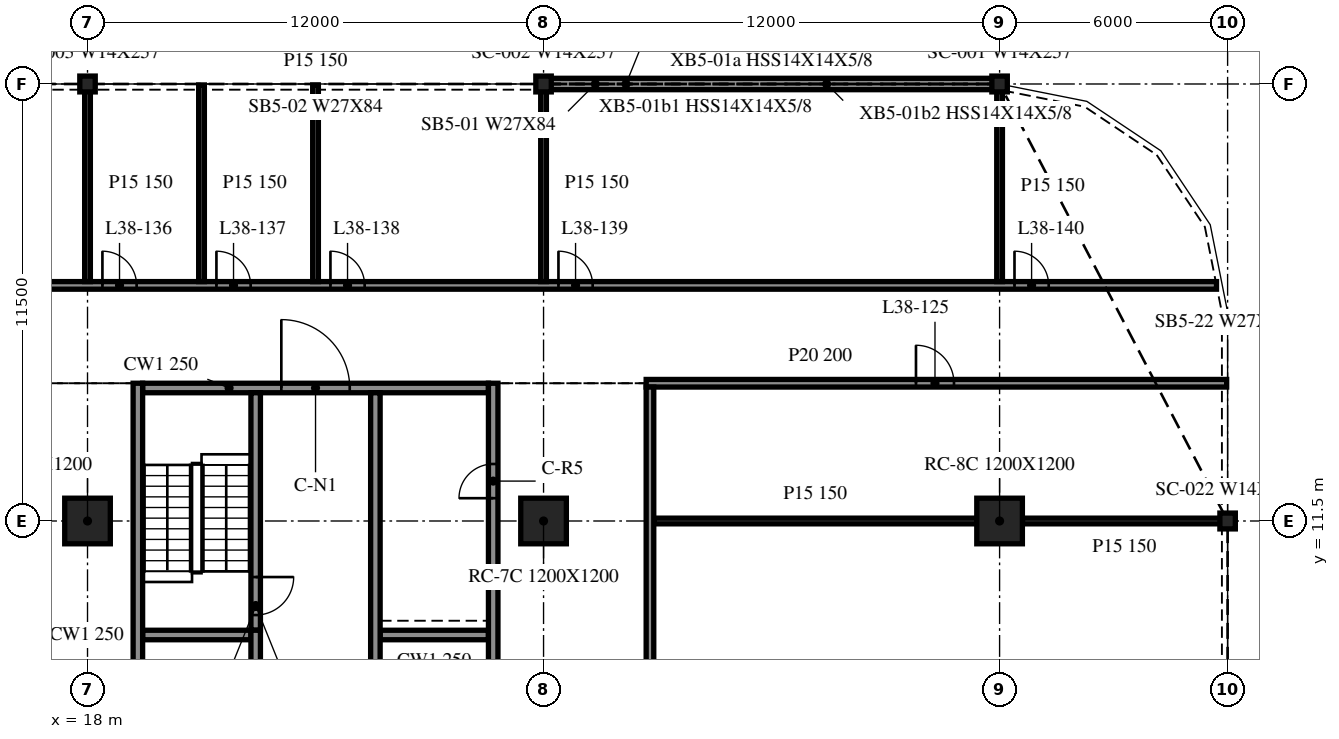
"""IFC4 building model, lengths in metres.
Left out: names, types, materials, properties, quantities, classifications, styles, units other than length and angle.
Written with IfcOpenShell. Run it as: python <this file> out.ifc"""

import sys

from ifc_helpers import new_model, si_unit, direction, frame, frame_2d, origin, origin_2d, place, context, subcontext, project, spatial, rectangle, i_section, extrude, element, fill, save


model = new_model("IFC4")
c1 = context("Model", 3, precision=1e-05, world=origin(), true_north=direction((0.0, 1.0)))
c2 = subcontext(c1, "Body", "Model", "MODEL_VIEW")
j1 = project(units=[si_unit("LENGTHUNIT", "METRE"), si_unit("PLANEANGLEUNIT", "RADIAN")], contexts=[c1])
p1 = place(None, origin())
s1 = spatial("IfcSite", under=j1, at=p1, CompositionType="ELEMENT")
p2 = place(p1, origin())
s2 = spatial("IfcBuilding", under=s1, at=p2, CompositionType="ELEMENT")
p3 = place(p2, frame((0.0, 0.0, 163.0)))
s3 = spatial("IfcBuildingStorey", under=s2, at=p3, CompositionType="ELEMENT", Elevation=163.0)
for number, where, z_axis, x_axis in (
    (1, (18.0, 11.5, -0.34), (0.0, 0.0, 1.0), (1.0, 0.0, 0.0)),
    (2, (30.0, 11.5, -0.34), (0.0, 0.0, 1.0), (1.0, 0.0, 0.0)),
    (3, (42.0, 11.5, -0.34), (0.0, 0.0, 1.0), (1.0, 0.0, 0.0)),
):
    element("IfcColumn", number, at=place(p3, frame(where, z_axis=z_axis, x_axis=x_axis)), inside=s3, PredefinedType="COLUMN", context=c2, shape_type="SweptSolid", body=[
        extrude(rectangle(XDim=1.2, YDim=1.2, at=origin_2d()), origin(), (0.0, 0.0, 1.0), 3.8),
    ])
for number, where, z_axis, x_axis in (
    (4, (42.0, 23.0, -0.34), (0.0, 0.0, 1.0), (1.0, 0.0, 0.0)),
    (5, (30.0, 23.0, -0.34), (0.0, 0.0, 1.0), (1.0, 0.0, 0.0)),
    (6, (18.0, 23.0, -0.34), (0.0, 0.0, 1.0), (1.0, 0.0, 0.0)),
    (7, (48.0, 11.5, -0.34), (0.0, 0.0, 1.0), (1.0, 0.0, 0.0)),
):
    element("IfcColumn", number, at=place(p3, frame(where, z_axis=z_axis, x_axis=x_axis)), inside=s3, PredefinedType="COLUMN", context=c2, shape_type="SweptSolid", body=[
        extrude(i_section(OverallWidth=0.406, OverallDepth=0.417, WebThickness=0.03, FlangeThickness=0.048, at=origin_2d()), origin(), (0.0, 0.0, 1.0), 3.8),
    ])
p4 = place(p3, frame((41.985, 23.0, 0.0), z_axis=(0.0, 0.0, 1.0), x_axis=(-1.0, 0.0, 0.0)))
e8 = element("IfcWall", 8, at=p4, inside=s3, PredefinedType="NOTDEFINED", context=c2, shape_type="SweptSolid", body=[
    extrude(rectangle(XDim=11.97, YDim=0.3, at=frame_2d((5.985, 0.0))), origin(), (0.0, 0.0, 1.0), 2.782),
])
p5 = place(p3, frame((19.325, 15.125, 0.0), z_axis=(0.0, 0.0, 1.0), x_axis=(0.0, -1.0, 0.0)))
e9 = element("IfcWall", 9, at=p5, inside=s3, PredefinedType="SOLIDWALL", context=c2, shape_type="SweptSolid", body=[
    extrude(rectangle(XDim=24.25, YDim=0.25, at=frame_2d((12.125, 0.0))), origin(), (0.0, 0.0, 1.0), 3.46),
])
p6 = place(p3, frame((28.675, -9.125, 0.0), z_axis=(0.0, 0.0, 1.0), x_axis=(0.0, 1.0, 0.0)))
e10 = element("IfcWall", 10, at=p6, inside=s3, PredefinedType="SOLIDWALL", context=c2, shape_type="SweptSolid", body=[
    extrude(rectangle(XDim=24.25, YDim=0.25, at=frame_2d((12.125, 0.0))), origin(), (0.0, 0.0, 1.0), 3.46),
])
p7 = place(p6, frame((14.425, 0.0, 0.0)))
e11 = element("IfcOpeningElement", 11, at=p7, cuts=e10, PredefinedType="OPENING", context=c2, shape_type="SweptSolid", body=[
    extrude(rectangle(XDim=0.9, YDim=2.1, at=frame_2d((0.45, 1.05))), frame((0.0, 0.135, 0.0), z_axis=(0.0, -1.0, 0.0), x_axis=(1.0, 0.0, 0.0)), (0.0, 0.0, 1.0), 0.27),
])
p8 = place(p6, frame((21.225, 0.0, 0.0)))
e12 = element("IfcOpeningElement", 12, at=p8, cuts=e10, PredefinedType="OPENING", context=c2, shape_type="SweptSolid", body=[
    extrude(rectangle(XDim=0.9, YDim=2.1, at=frame_2d((0.45, 1.05))), frame((0.0, 0.135, 0.0), z_axis=(0.0, -1.0, 0.0), x_axis=(1.0, 0.0, 0.0)), (0.0, 0.0, 1.0), 0.27),
])
p9 = place(p3, frame((19.45, 15.0, 0.0), z_axis=(0.0, 0.0, 1.0), x_axis=(1.0, 0.0, 0.0)))
e13 = element("IfcWall", 13, at=p9, inside=s3, PredefinedType="SOLIDWALL", context=c2, shape_type="SweptSolid", body=[
    extrude(rectangle(XDim=9.1, YDim=0.25, at=frame_2d((4.55, 0.0))), origin(), (0.0, 0.0, 1.0), 3.46),
])
p10 = place(p9, frame((3.65, 0.0, 0.0)))
e14 = element("IfcOpeningElement", 14, at=p10, cuts=e13, PredefinedType="OPENING", context=c2, shape_type="SweptSolid", body=[
    extrude(rectangle(XDim=1.8, YDim=2.1, at=frame_2d((0.9, 1.05))), frame((0.0, 0.135, 0.0), z_axis=(0.0, -1.0, 0.0), x_axis=(1.0, 0.0, 0.0)), (0.0, 0.0, 1.0), 0.27),
])
p11 = place(p3, frame((22.425, -8.875, 0.0), z_axis=(0.0, 0.0, 1.0), x_axis=(0.0, 1.0, 0.0)))
e15 = element("IfcWall", 15, at=p11, inside=s3, PredefinedType="SOLIDWALL", context=c2, shape_type="SweptSolid", body=[
    extrude(rectangle(XDim=17.5, YDim=0.25, at=frame_2d((8.75, 0.0))), origin(), (0.0, 0.0, 1.0), 3.46),
])
p12 = place(p11, frame((7.2, 0.0, 0.0)))
e16 = element("IfcOpeningElement", 16, at=p12, cuts=e15, PredefinedType="OPENING", context=c2, shape_type="SweptSolid", body=[
    extrude(rectangle(XDim=1.1, YDim=2.1, at=frame_2d((0.55, 1.05))), frame((0.0, 0.135, 0.0), z_axis=(0.0, -1.0, 0.0), x_axis=(1.0, 0.0, 0.0)), (0.0, 0.0, 1.0), 0.27),
])
p13 = place(p11, frame((9.95, 0.0, 0.0)))
e17 = element("IfcOpeningElement", 17, at=p13, cuts=e15, PredefinedType="OPENING", context=c2, shape_type="SweptSolid", body=[
    extrude(rectangle(XDim=1.1, YDim=2.1, at=frame_2d((0.55, 1.05))), frame((0.0, 0.135, 0.0), z_axis=(0.0, -1.0, 0.0), x_axis=(1.0, 0.0, 0.0)), (0.0, 0.0, 1.0), 0.27),
])
p14 = place(p11, frame((12.7, 0.0, 0.0)))
e18 = element("IfcOpeningElement", 18, at=p14, cuts=e15, PredefinedType="OPENING", context=c2, shape_type="SweptSolid", body=[
    extrude(rectangle(XDim=1.1, YDim=2.1, at=frame_2d((0.55, 1.05))), frame((0.0, 0.135, 0.0), z_axis=(0.0, -1.0, 0.0), x_axis=(1.0, 0.0, 0.0)), (0.0, 0.0, 1.0), 0.27),
])
p15 = place(p11, frame((15.45, 0.0, 0.0)))
e19 = element("IfcOpeningElement", 19, at=p15, cuts=e15, PredefinedType="OPENING", context=c2, shape_type="SweptSolid", body=[
    extrude(rectangle(XDim=1.1, YDim=2.1, at=frame_2d((0.55, 1.05))), frame((0.0, 0.135, 0.0), z_axis=(0.0, -1.0, 0.0), x_axis=(1.0, 0.0, 0.0)), (0.0, 0.0, 1.0), 0.27),
])
p16 = place(p11, frame((1.012, 0.0, 0.0)))
e20 = element("IfcOpeningElement", 20, at=p16, cuts=e15, PredefinedType="OPENING", context=c2, shape_type="SweptSolid", body=[
    extrude(rectangle(XDim=0.9, YDim=2.1, at=frame_2d((0.45, 1.05))), frame((0.0, 0.135, 0.0), z_axis=(0.0, -1.0, 0.0), x_axis=(1.0, 0.0, 0.0)), (0.0, 0.0, 1.0), 0.27),
])
p17 = place(p11, frame((4.087, 0.0, 0.0)))
e21 = element("IfcOpeningElement", 21, at=p17, cuts=e15, PredefinedType="OPENING", context=c2, shape_type="SweptSolid", body=[
    extrude(rectangle(XDim=0.9, YDim=2.1, at=frame_2d((0.45, 1.05))), frame((0.0, 0.135, 0.0), z_axis=(0.0, -1.0, 0.0), x_axis=(1.0, 0.0, 0.0)), (0.0, 0.0, 1.0), 0.27),
])
p18 = place(p3, frame((22.425, 14.875, 0.0), z_axis=(0.0, 0.0, 1.0), x_axis=(0.0, -1.0, 0.0)))
e22 = element("IfcWall", 22, at=p18, inside=s3, PredefinedType="SOLIDWALL", context=c2, shape_type="SweptSolid", body=[
    extrude(rectangle(XDim=6.25, YDim=0.25, at=frame_2d((3.125, 0.0))), origin(), (0.0, 0.0, 1.0), 3.46),
])
p19 = place(p18, frame((4.85, 0.0, 0.0)))
e23 = element("IfcOpeningElement", 23, at=p19, cuts=e22, PredefinedType="OPENING", context=c2, shape_type="SweptSolid", body=[
    extrude(rectangle(XDim=1.0, YDim=2.1, at=frame_2d((0.5, 1.05))), frame((0.0, 0.135, 0.0), z_axis=(0.0, -1.0, 0.0), x_axis=(1.0, 0.0, 0.0)), (0.0, 0.0, 1.0), 0.27),
])
p20 = place(p3, frame((25.575, 14.875, 0.0), z_axis=(0.0, 0.0, 1.0), x_axis=(0.0, -1.0, 0.0)))
e24 = element("IfcWall", 24, at=p20, inside=s3, PredefinedType="SOLIDWALL", context=c2, shape_type="SweptSolid", body=[
    extrude(rectangle(XDim=17.5, YDim=0.25, at=frame_2d((8.75, 0.0))), origin(), (0.0, 0.0, 1.0), 3.46),
])
p21 = place(p20, frame((15.45, 0.0, 0.0)))
e25 = element("IfcOpeningElement", 25, at=p21, cuts=e24, PredefinedType="OPENING", context=c2, shape_type="SweptSolid", body=[
    extrude(rectangle(XDim=1.1, YDim=2.1, at=frame_2d((0.55, 1.05))), frame((0.0, 0.135, 0.0), z_axis=(0.0, -1.0, 0.0), x_axis=(1.0, 0.0, 0.0)), (0.0, 0.0, 1.0), 0.27),
])
p22 = place(p20, frame((12.8, 0.0, 0.0)))
e26 = element("IfcOpeningElement", 26, at=p22, cuts=e24, PredefinedType="OPENING", context=c2, shape_type="SweptSolid", body=[
    extrude(rectangle(XDim=0.9, YDim=2.1, at=frame_2d((0.45, 1.05))), frame((0.0, 0.135, 0.0), z_axis=(0.0, -1.0, 0.0), x_axis=(1.0, 0.0, 0.0)), (0.0, 0.0, 1.0), 0.27),
])
for number, where, z_axis, x_axis in (
    (27, (19.45, 8.5, 0.0), (0.0, 0.0, 1.0), (1.0, 0.0, 0.0)),
    (28, (25.7, 8.5, 0.0), (0.0, 0.0, 1.0), (1.0, 0.0, 0.0)),
):
    element("IfcWall", number, at=place(p3, frame(where, z_axis=z_axis, x_axis=x_axis)), inside=s3, PredefinedType="SOLIDWALL", context=c2, shape_type="SweptSolid", body=[
        extrude(rectangle(XDim=2.85, YDim=0.25, at=frame_2d((1.425, 0.0))), origin(), (0.0, 0.0, 1.0), 3.46),
    ])
p23 = place(p3, frame((32.9, 11.5, 0.0), z_axis=(0.0, 0.0, 1.0), x_axis=(1.0, 0.0, 0.0)))
e29 = element("IfcWall", 29, at=p23, inside=s3, PredefinedType="PARTITIONING", context=c2, shape_type="SweptSolid", body=[
    extrude(rectangle(XDim=8.5, YDim=0.15, at=frame_2d((4.25, 0.0))), origin(), (0.0, 0.0, 1.0), 3.46),
])
p24 = place(p3, frame((42.6, 11.5, 0.0), z_axis=(0.0, 0.0, 1.0), x_axis=(1.0, 0.0, 0.0)))
e30 = element("IfcWall", 30, at=p24, inside=s3, PredefinedType="PARTITIONING", context=c2, shape_type="SweptSolid", body=[
    extrude(rectangle(XDim=5.375, YDim=0.15, at=frame_2d((2.688, 0.0))), origin(), (0.0, 0.0, 1.0), 3.46),
])
p25 = place(p3, frame((32.7, 15.125, 0.0), z_axis=(0.0, 0.0, 1.0), x_axis=(1.0, 0.0, 0.0)))
e31 = element("IfcWall", 31, at=p25, inside=s3, PredefinedType="PARTITIONING", context=c2, shape_type="SweptSolid", body=[
    extrude(rectangle(XDim=15.275, YDim=0.2, at=frame_2d((7.638, 0.0))), origin(), (0.0, 0.0, 1.0), 3.46),
])
p26 = place(p25, frame((7.1, 0.0, 0.0)))
e32 = element("IfcOpeningElement", 32, at=p26, cuts=e31, PredefinedType="OPENING", context=c2, shape_type="SweptSolid", body=[
    extrude(rectangle(XDim=1.0, YDim=2.1, at=frame_2d((0.5, 1.05))), frame((0.0, 0.11, 0.0), z_axis=(0.0, -1.0, 0.0), x_axis=(1.0, 0.0, 0.0)), (0.0, 0.0, 1.0), 0.22),
])
p27 = place(p3, frame((-47.708, 17.7, 0.0), z_axis=(0.0, 0.0, 1.0), x_axis=(1.0, 0.0, 0.0)))
e33 = element("IfcWall", 33, at=p27, inside=s3, PredefinedType="PARTITIONING", context=c2, shape_type="SweptSolid", body=[
    extrude(rectangle(XDim=95.416, YDim=0.2, at=frame_2d((47.708, 0.0))), origin(), (0.0, 0.0, 1.0), 3.46),
])
p28 = place(p27, frame((4.5, 0.0, 0.0)))
e34 = element("IfcOpeningElement", 34, at=p28, cuts=e33, PredefinedType="OPENING", context=c2, shape_type="SweptSolid", body=[
    extrude(rectangle(XDim=0.9, YDim=2.1, at=frame_2d((0.45, 1.05))), frame((0.0, 0.11, 0.0), z_axis=(0.0, -1.0, 0.0), x_axis=(1.0, 0.0, 0.0)), (0.0, 0.0, 1.0), 0.22),
])
p29 = place(p27, frame((16.5, 0.0, 0.0)))
e35 = element("IfcOpeningElement", 35, at=p29, cuts=e33, PredefinedType="OPENING", context=c2, shape_type="SweptSolid", body=[
    extrude(rectangle(XDim=0.9, YDim=2.1, at=frame_2d((0.45, 1.05))), frame((0.0, 0.11, 0.0), z_axis=(0.0, -1.0, 0.0), x_axis=(1.0, 0.0, 0.0)), (0.0, 0.0, 1.0), 0.22),
])
p30 = place(p27, frame((19.5, 0.0, 0.0)))
e36 = element("IfcOpeningElement", 36, at=p30, cuts=e33, PredefinedType="OPENING", context=c2, shape_type="SweptSolid", body=[
    extrude(rectangle(XDim=0.9, YDim=2.1, at=frame_2d((0.45, 1.05))), frame((0.0, 0.11, 0.0), z_axis=(0.0, -1.0, 0.0), x_axis=(1.0, 0.0, 0.0)), (0.0, 0.0, 1.0), 0.22),
])
p31 = place(p27, frame((22.5, 0.0, 0.0)))
e37 = element("IfcOpeningElement", 37, at=p31, cuts=e33, PredefinedType="OPENING", context=c2, shape_type="SweptSolid", body=[
    extrude(rectangle(XDim=0.9, YDim=2.1, at=frame_2d((0.45, 1.05))), frame((0.0, 0.11, 0.0), z_axis=(0.0, -1.0, 0.0), x_axis=(1.0, 0.0, 0.0)), (0.0, 0.0, 1.0), 0.22),
])
p32 = place(p27, frame((28.5, 0.0, 0.0)))
e38 = element("IfcOpeningElement", 38, at=p32, cuts=e33, PredefinedType="OPENING", context=c2, shape_type="SweptSolid", body=[
    extrude(rectangle(XDim=0.9, YDim=2.1, at=frame_2d((0.45, 1.05))), frame((0.0, 0.11, 0.0), z_axis=(0.0, -1.0, 0.0), x_axis=(1.0, 0.0, 0.0)), (0.0, 0.0, 1.0), 0.22),
])
p33 = place(p27, frame((40.5, 0.0, 0.0)))
e39 = element("IfcOpeningElement", 39, at=p33, cuts=e33, PredefinedType="OPENING", context=c2, shape_type="SweptSolid", body=[
    extrude(rectangle(XDim=0.9, YDim=2.1, at=frame_2d((0.45, 1.05))), frame((0.0, 0.11, 0.0), z_axis=(0.0, -1.0, 0.0), x_axis=(1.0, 0.0, 0.0)), (0.0, 0.0, 1.0), 0.22),
])
p34 = place(p27, frame((43.5, 0.0, 0.0)))
e40 = element("IfcOpeningElement", 40, at=p34, cuts=e33, PredefinedType="OPENING", context=c2, shape_type="SweptSolid", body=[
    extrude(rectangle(XDim=0.9, YDim=2.1, at=frame_2d((0.45, 1.05))), frame((0.0, 0.11, 0.0), z_axis=(0.0, -1.0, 0.0), x_axis=(1.0, 0.0, 0.0)), (0.0, 0.0, 1.0), 0.22),
])
p35 = place(p27, frame((46.5, 0.0, 0.0)))
e41 = element("IfcOpeningElement", 41, at=p35, cuts=e33, PredefinedType="OPENING", context=c2, shape_type="SweptSolid", body=[
    extrude(rectangle(XDim=0.9, YDim=2.1, at=frame_2d((0.45, 1.05))), frame((0.0, 0.11, 0.0), z_axis=(0.0, -1.0, 0.0), x_axis=(1.0, 0.0, 0.0)), (0.0, 0.0, 1.0), 0.22),
])
p36 = place(p27, frame((48.1, 0.0, 0.0)))
e42 = element("IfcOpeningElement", 42, at=p36, cuts=e33, PredefinedType="OPENING", context=c2, shape_type="SweptSolid", body=[
    extrude(rectangle(XDim=0.9, YDim=2.1, at=frame_2d((0.45, 1.05))), frame((0.0, 0.11, 0.0), z_axis=(0.0, -1.0, 0.0), x_axis=(1.0, 0.0, 0.0)), (0.0, 0.0, 1.0), 0.22),
])
p37 = place(p27, frame((54.1, 0.0, 0.0)))
e43 = element("IfcOpeningElement", 43, at=p37, cuts=e33, PredefinedType="OPENING", context=c2, shape_type="SweptSolid", body=[
    extrude(rectangle(XDim=0.9, YDim=2.1, at=frame_2d((0.45, 1.05))), frame((0.0, 0.11, 0.0), z_axis=(0.0, -1.0, 0.0), x_axis=(1.0, 0.0, 0.0)), (0.0, 0.0, 1.0), 0.22),
])
p38 = place(p27, frame((66.1, 0.0, 0.0)))
e44 = element("IfcOpeningElement", 44, at=p38, cuts=e33, PredefinedType="OPENING", context=c2, shape_type="SweptSolid", body=[
    extrude(rectangle(XDim=0.9, YDim=2.1, at=frame_2d((0.45, 1.05))), frame((0.0, 0.11, 0.0), z_axis=(0.0, -1.0, 0.0), x_axis=(1.0, 0.0, 0.0)), (0.0, 0.0, 1.0), 0.22),
])
p39 = place(p27, frame((69.1, 0.0, 0.0)))
e45 = element("IfcOpeningElement", 45, at=p39, cuts=e33, PredefinedType="OPENING", context=c2, shape_type="SweptSolid", body=[
    extrude(rectangle(XDim=0.9, YDim=2.1, at=frame_2d((0.45, 1.05))), frame((0.0, 0.11, 0.0), z_axis=(0.0, -1.0, 0.0), x_axis=(1.0, 0.0, 0.0)), (0.0, 0.0, 1.0), 0.22),
])
p40 = place(p27, frame((72.1, 0.0, 0.0)))
e46 = element("IfcOpeningElement", 46, at=p40, cuts=e33, PredefinedType="OPENING", context=c2, shape_type="SweptSolid", body=[
    extrude(rectangle(XDim=0.9, YDim=2.1, at=frame_2d((0.45, 1.05))), frame((0.0, 0.11, 0.0), z_axis=(0.0, -1.0, 0.0), x_axis=(1.0, 0.0, 0.0)), (0.0, 0.0, 1.0), 0.22),
])
p41 = place(p27, frame((78.1, 0.0, 0.0)))
e47 = element("IfcOpeningElement", 47, at=p41, cuts=e33, PredefinedType="OPENING", context=c2, shape_type="SweptSolid", body=[
    extrude(rectangle(XDim=0.9, YDim=2.1, at=frame_2d((0.45, 1.05))), frame((0.0, 0.11, 0.0), z_axis=(0.0, -1.0, 0.0), x_axis=(1.0, 0.0, 0.0)), (0.0, 0.0, 1.0), 0.22),
])
p42 = place(p27, frame((90.1, 0.0, 0.0)))
e48 = element("IfcOpeningElement", 48, at=p42, cuts=e33, PredefinedType="OPENING", context=c2, shape_type="SweptSolid", body=[
    extrude(rectangle(XDim=0.9, YDim=2.1, at=frame_2d((0.45, 1.05))), frame((0.0, 0.11, 0.0), z_axis=(0.0, -1.0, 0.0), x_axis=(1.0, 0.0, 0.0)), (0.0, 0.0, 1.0), 0.22),
])
for number, where, z_axis, x_axis in (
    (49, (18.0, 17.8, 0.0), (0.0, 0.0, 1.0), (0.0, 1.0, 0.0)),
    (50, (21.0, 17.8, 0.0), (0.0, 0.0, 1.0), (0.0, 1.0, 0.0)),
    (51, (24.0, 17.8, 0.0), (0.0, 0.0, 1.0), (0.0, 1.0, 0.0)),
    (52, (30.0, 17.8, 0.0), (0.0, 0.0, 1.0), (0.0, 1.0, 0.0)),
):
    element("IfcWall", number, at=place(p3, frame(where, z_axis=z_axis, x_axis=x_axis)), inside=s3, PredefinedType="PARTITIONING", context=c2, shape_type="SweptSolid", body=[
        extrude(rectangle(XDim=5.175, YDim=0.15, at=frame_2d((2.587, 0.0))), origin(), (0.0, 0.0, 1.0), 3.46),
    ])
p43 = place(p3, frame((32.8, -9.025, 0.0), z_axis=(0.0, 0.0, 1.0), x_axis=(0.0, 1.0, 0.0)))
e53 = element("IfcWall", 53, at=p43, inside=s3, PredefinedType="PARTITIONING", context=c2, shape_type="SweptSolid", body=[
    extrude(rectangle(XDim=24.05, YDim=0.2, at=frame_2d((12.025, 0.0))), origin(), (0.0, 0.0, 1.0), 3.46),
])
p44 = place(p43, frame((12.3, 0.0, 0.0)))
e54 = element("IfcOpeningElement", 54, at=p44, cuts=e53, PredefinedType="OPENING", context=c2, shape_type="SweptSolid", body=[
    extrude(rectangle(XDim=1.0, YDim=2.1, at=frame_2d((0.5, 1.05))), frame((0.0, 0.11, 0.0), z_axis=(0.0, -1.0, 0.0), x_axis=(1.0, 0.0, 0.0)), (0.0, 0.0, 1.0), 0.22),
])
p45 = place(p3, frame((42.0, 17.8, 0.0), z_axis=(0.0, 0.0, 1.0), x_axis=(0.0, 1.0, 0.0)))
e55 = element("IfcWall", 55, at=p45, inside=s3, PredefinedType="PARTITIONING", context=c2, shape_type="SweptSolid", body=[
    extrude(rectangle(XDim=5.047, YDim=0.15, at=frame_2d((2.523, 0.0))), origin(), (0.0, 0.0, 1.0), 3.46),
])
p46 = place(p10, origin())
e56 = element("IfcDoor", 56, at=p46, inside=s3, OperationType="DOUBLE_DOOR_SINGLE_SWING", PredefinedType="DOOR", context=c2, shape_type="SweptSolid", body=[
    extrude(rectangle(XDim=1.8, YDim=2.1, at=frame_2d((0.9, 1.05))), frame((0.0, 0.025, 0.0), z_axis=(0.0, -1.0, 0.0), x_axis=(1.0, 0.0, 0.0)), (0.0, 0.0, 1.0), 0.05),
])
fill(e14, e56)
p47 = place(p8, origin())
e57 = element("IfcDoor", 57, at=p47, inside=s3, OperationType="SINGLE_SWING_LEFT", PredefinedType="DOOR", context=c2, shape_type="SweptSolid", body=[
    extrude(rectangle(XDim=0.9, YDim=2.1, at=frame_2d((0.45, 1.05))), frame((0.0, 0.025, 0.0), z_axis=(0.0, -1.0, 0.0), x_axis=(1.0, 0.0, 0.0)), (0.0, 0.0, 1.0), 0.05),
])
fill(e12, e57)
p48 = place(p19, origin())
e58 = element("IfcDoor", 58, at=p48, inside=s3, OperationType="SINGLE_SWING_RIGHT", PredefinedType="DOOR", context=c2, shape_type="SweptSolid", body=[
    extrude(rectangle(XDim=1.0, YDim=2.1, at=frame_2d((0.5, 1.05))), frame((0.0, 0.025, 0.0), z_axis=(0.0, -1.0, 0.0), x_axis=(1.0, 0.0, 0.0)), (0.0, 0.0, 1.0), 0.05),
])
fill(e23, e58)
p49 = place(p26, origin())
e59 = element("IfcDoor", 59, at=p49, inside=s3, OperationType="SINGLE_SWING_LEFT", PredefinedType="DOOR", context=c2, shape_type="SweptSolid", body=[
    extrude(rectangle(XDim=1.0, YDim=2.1, at=frame_2d((0.5, 1.05))), frame((0.0, 0.025, 0.0), z_axis=(0.0, -1.0, 0.0), x_axis=(1.0, 0.0, 0.0)), (0.0, 0.0, 1.0), 0.05),
])
fill(e32, e59)
p50 = place(p38, origin())
e60 = element("IfcDoor", 60, at=p50, inside=s3, OperationType="SINGLE_SWING_RIGHT", PredefinedType="DOOR", context=c2, shape_type="SweptSolid", body=[
    extrude(rectangle(XDim=0.9, YDim=2.1, at=frame_2d((0.45, 1.05))), frame((0.0, 0.025, 0.0), z_axis=(0.0, -1.0, 0.0), x_axis=(1.0, 0.0, 0.0)), (0.0, 0.0, 1.0), 0.05),
])
fill(e44, e60)
p51 = place(p39, origin())
e61 = element("IfcDoor", 61, at=p51, inside=s3, OperationType="SINGLE_SWING_RIGHT", PredefinedType="DOOR", context=c2, shape_type="SweptSolid", body=[
    extrude(rectangle(XDim=0.9, YDim=2.1, at=frame_2d((0.45, 1.05))), frame((0.0, 0.025, 0.0), z_axis=(0.0, -1.0, 0.0), x_axis=(1.0, 0.0, 0.0)), (0.0, 0.0, 1.0), 0.05),
])
fill(e45, e61)
p52 = place(p40, origin())
e62 = element("IfcDoor", 62, at=p52, inside=s3, OperationType="SINGLE_SWING_RIGHT", PredefinedType="DOOR", context=c2, shape_type="SweptSolid", body=[
    extrude(rectangle(XDim=0.9, YDim=2.1, at=frame_2d((0.45, 1.05))), frame((0.0, 0.025, 0.0), z_axis=(0.0, -1.0, 0.0), x_axis=(1.0, 0.0, 0.0)), (0.0, 0.0, 1.0), 0.05),
])
fill(e46, e62)
p53 = place(p41, origin())
e63 = element("IfcDoor", 63, at=p53, inside=s3, OperationType="SINGLE_SWING_RIGHT", PredefinedType="DOOR", context=c2, shape_type="SweptSolid", body=[
    extrude(rectangle(XDim=0.9, YDim=2.1, at=frame_2d((0.45, 1.05))), frame((0.0, 0.025, 0.0), z_axis=(0.0, -1.0, 0.0), x_axis=(1.0, 0.0, 0.0)), (0.0, 0.0, 1.0), 0.05),
])
fill(e47, e63)
p54 = place(p42, origin())
e64 = element("IfcDoor", 64, at=p54, inside=s3, OperationType="SINGLE_SWING_RIGHT", PredefinedType="DOOR", context=c2, shape_type="SweptSolid", body=[
    extrude(rectangle(XDim=0.9, YDim=2.1, at=frame_2d((0.45, 1.05))), frame((0.0, 0.025, 0.0), z_axis=(0.0, -1.0, 0.0), x_axis=(1.0, 0.0, 0.0)), (0.0, 0.0, 1.0), 0.05),
])
fill(e48, e64)
save(model, sys.argv[1])
